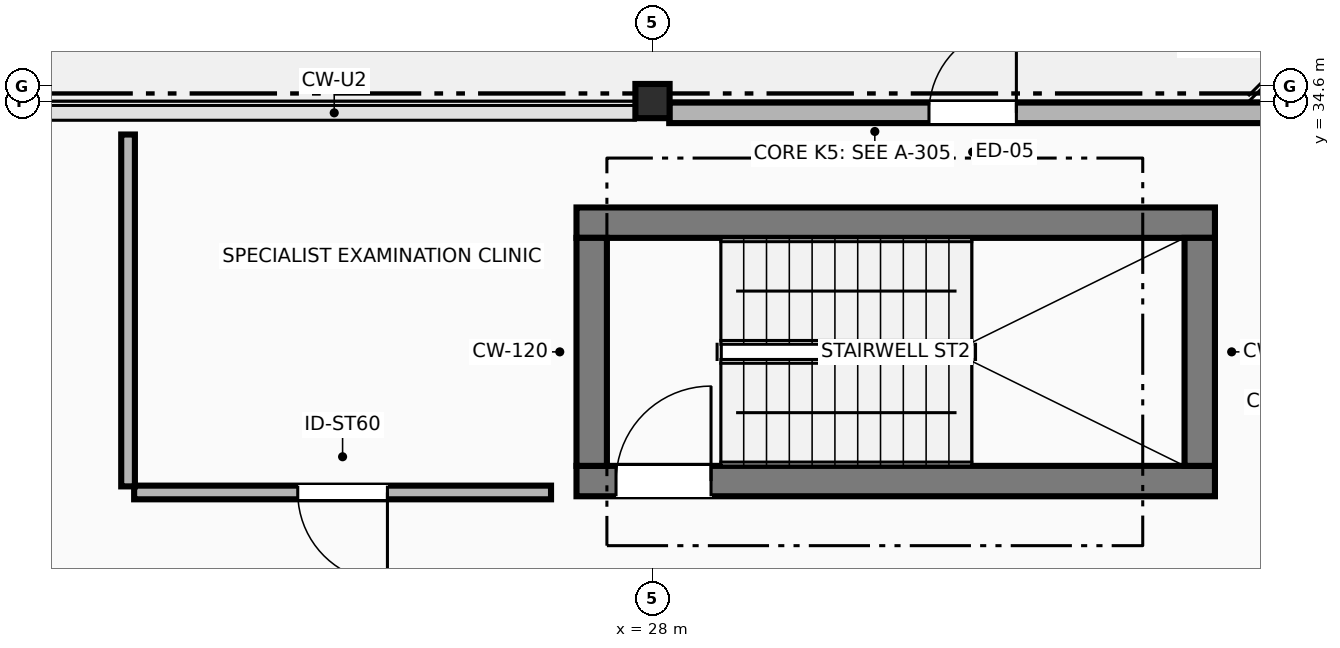
"""IFC4 building model, lengths in metres.
Left out: names, types, materials, properties, quantities, classifications, styles, units other than length and angle.
Written with IfcOpenShell. Run it as: python <this file> out.ifc"""

import sys

from ifc_helpers import new_model, si_unit, direction, frame, frame_2d, origin, origin_2d, place, context, subcontext, project, spatial, rectangle, extrude, element, fill, save


model = new_model("IFC4")
c1 = context("Model", 3, precision=1e-05, world=origin(), true_north=direction((0.0, 1.0)))
c2 = subcontext(c1, "Body", "Model", "MODEL_VIEW")
j1 = project(units=[si_unit("LENGTHUNIT", "METRE"), si_unit("PLANEANGLEUNIT", "RADIAN")], contexts=[c1])
p1 = place(None, origin())
s1 = spatial("IfcSite", under=j1, at=p1, CompositionType="ELEMENT")
p2 = place(p1, origin())
s2 = spatial("IfcBuilding", under=s1, at=p2, CompositionType="ELEMENT")
p3 = place(p2, frame((0.0, 0.0, 18.0)))
s3 = spatial("IfcBuildingStorey", under=s2, at=p3, CompositionType="ELEMENT", Elevation=18.0)
p4 = place(p3, frame((28.0, 34.6, 0.0), z_axis=(0.0, 0.0, 1.0), x_axis=(1.0, 0.0, 0.0)))
e1 = element("IfcColumn", 1, at=p4, inside=s3, PredefinedType="COLUMN", context=c2, shape_type="SweptSolid", body=[
    extrude(rectangle(XDim=0.45, YDim=0.45, at=origin_2d()), origin(), (0.0, 0.0, 1.0), 4.2),
])
p5 = place(p3, frame((36.205, 34.445, 0.0), z_axis=(0.0, 0.0, 1.0), x_axis=(-1.0, 0.0, 0.0)))
e2 = element("IfcWall", 2, at=p5, inside=s3, PredefinedType="STANDARD", context=c2, shape_type="SweptSolid", body=[
    extrude(rectangle(XDim=7.985, YDim=0.27, at=frame_2d((3.993, 0.0))), origin(), (0.0, 0.0, 1.0), 3.275),
])
p6 = place(p5, frame((3.417, 0.0, 0.0)))
e3 = element("IfcOpeningElement", 3, at=p6, cuts=e2, PredefinedType="OPENING", context=c2, shape_type="SweptSolid", body=[
    extrude(rectangle(XDim=1.15, YDim=2.2, at=frame_2d((0.575, 1.1))), frame((0.0, 0.145, 0.0), z_axis=(0.0, -1.0, 0.0), x_axis=(1.0, 0.0, 0.0)), (0.0, 0.0, 1.0), 0.29),
])
p7 = place(p3, frame((27.0, 29.6, 0.0), z_axis=(0.0, 0.0, 1.0), x_axis=(1.0, 0.0, 0.0)))
e4 = element("IfcWall", 4, at=p7, inside=s3, PredefinedType="SHEAR", context=c2, shape_type="SweptSolid", body=[
    extrude(rectangle(XDim=8.4, YDim=0.4, at=frame_2d((4.2, 0.0))), origin(), (0.0, 0.0, 1.0), 3.94),
])
p8 = place(p7, frame((0.52, 0.0, 0.0)))
e5 = element("IfcOpeningElement", 5, at=p8, cuts=e4, PredefinedType="OPENING", context=c2, shape_type="SweptSolid", body=[
    extrude(rectangle(XDim=1.25, YDim=2.2, at=frame_2d((0.625, 1.1))), frame((0.0, 0.21, 0.0), z_axis=(0.0, -1.0, 0.0), x_axis=(1.0, 0.0, 0.0)), (0.0, 0.0, 1.0), 0.42),
])
p9 = place(p3, frame((35.4, 33.0, 0.0), z_axis=(0.0, 0.0, 1.0), x_axis=(-1.0, 0.0, 0.0)))
e6 = element("IfcWall", 6, at=p9, inside=s3, PredefinedType="SHEAR", context=c2, shape_type="SweptSolid", body=[
    extrude(rectangle(XDim=8.4, YDim=0.4, at=frame_2d((4.2, 0.0))), origin(), (0.0, 0.0, 1.0), 3.94),
])
for number, where, z_axis, x_axis in (
    (7, (27.2, 29.8, 0.0), (0.0, 0.0, 1.0), (0.0, 1.0, 0.0)),
    (8, (35.2, 32.8, 0.0), (0.0, 0.0, 1.0), (0.0, -1.0, 0.0)),
):
    element("IfcWall", number, at=place(p3, frame(where, z_axis=z_axis, x_axis=x_axis)), inside=s3, PredefinedType="SHEAR", context=c2, shape_type="SweptSolid", body=[
        extrude(rectangle(XDim=3.0, YDim=0.4, at=frame_2d((1.5, 0.0))), origin(), (0.0, 0.0, 1.0), 3.94),
    ])
p10 = place(p3, frame((26.665, 29.45, 0.0), z_axis=(0.0, 0.0, 1.0), x_axis=(-1.0, 0.0, 0.0)))
e9 = element("IfcWall", 9, at=p10, inside=s3, PredefinedType="PARTITIONING", context=c2, shape_type="SweptSolid", body=[
    extrude(rectangle(XDim=5.485, YDim=0.18, at=frame_2d((2.743, 0.0))), origin(), (0.0, 0.0, 1.0), 3.94),
])
p11 = place(p10, frame((2.153, 0.0, 0.0)))
e10 = element("IfcOpeningElement", 10, at=p11, cuts=e9, PredefinedType="OPENING", context=c2, shape_type="SweptSolid", body=[
    extrude(rectangle(XDim=1.18, YDim=2.18, at=frame_2d((0.59, 1.09))), frame((0.0, 0.1, 0.0), z_axis=(0.0, -1.0, 0.0), x_axis=(1.0, 0.0, 0.0)), (0.0, 0.0, 1.0), 0.2),
])
p12 = place(p3, frame((21.1, 29.53, 0.0), z_axis=(0.0, 0.0, 1.0), x_axis=(0.0, 1.0, 0.0)))
e11 = element("IfcWall", 11, at=p12, inside=s3, PredefinedType="PARTITIONING", context=c2, shape_type="SweptSolid", body=[
    extrude(rectangle(XDim=4.63, YDim=0.18, at=frame_2d((2.315, 0.0))), origin(), (0.0, 0.0, 1.0), 3.94),
])
p13 = place(p6, frame((1.15, 0.0, 0.0), z_axis=(0.0, 0.0, 1.0), x_axis=(-1.0, 0.0, 0.0)))
e12 = element("IfcDoor", 12, at=p13, inside=s3, OperationType="SINGLE_SWING_RIGHT", PredefinedType="DOOR", context=c2, shape_type="SweptSolid", body=[
    extrude(rectangle(XDim=1.15, YDim=2.2, at=frame_2d((0.575, 1.1))), frame((0.0, 0.025, 0.0), z_axis=(0.0, -1.0, 0.0), x_axis=(1.0, 0.0, 0.0)), (0.0, 0.0, 1.0), 0.05),
])
fill(e3, e12)
p14 = place(p8, origin())
e13 = element("IfcDoor", 13, at=p14, inside=s3, OperationType="SINGLE_SWING_RIGHT", PredefinedType="DOOR", context=c2, shape_type="SweptSolid", body=[
    extrude(rectangle(XDim=1.25, YDim=2.2, at=frame_2d((0.625, 1.1))), frame((0.0, 0.025, 0.0), z_axis=(0.0, -1.0, 0.0), x_axis=(1.0, 0.0, 0.0)), (0.0, 0.0, 1.0), 0.05),
])
fill(e5, e13)
p15 = place(p11, origin())
e14 = element("IfcDoor", 14, at=p15, inside=s3, OperationType="SINGLE_SWING_LEFT", PredefinedType="DOOR", context=c2, shape_type="SweptSolid", body=[
    extrude(rectangle(XDim=1.18, YDim=2.18, at=frame_2d((0.59, 1.09))), frame((0.0, 0.025, 0.0), z_axis=(0.0, -1.0, 0.0), x_axis=(1.0, 0.0, 0.0)), (0.0, 0.0, 1.0), 0.05),
])
fill(e10, e14)
save(model, sys.argv[1])
